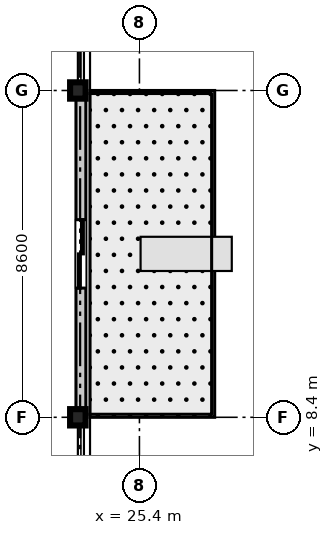
"""IFC4 building model, lengths in metres.
Left out: names, types, materials, properties, quantities, classifications, styles, units other than length and angle.
Written with IfcOpenShell. Run it as: python <this file> out.ifc"""

import sys

from ifc_helpers import new_model, si_unit, direction, frame, frame_2d, origin, origin_2d, place, context, subcontext, project, spatial, rectangle, i_section, extrude, source, transform, mapped, element, fill, save


model = new_model("IFC4")
c1 = context("Model", 3, precision=1e-05, world=origin(), true_north=direction((0.0, 1.0)))
c2 = subcontext(c1, "Body", "Model", "MODEL_VIEW")
j1 = project(units=[si_unit("LENGTHUNIT", "METRE"), si_unit("PLANEANGLEUNIT", "RADIAN")], contexts=[c1])
p1 = place(None, origin())
s1 = spatial("IfcSite", under=j1, at=p1, CompositionType="ELEMENT")
p2 = place(p1, origin())
s2 = spatial("IfcBuilding", under=s1, at=p2, CompositionType="ELEMENT")
p3 = place(p2, frame((0.0, 0.0, 102.9)))
s3 = spatial("IfcBuildingStorey", under=s2, at=p3, CompositionType="ELEMENT", Elevation=102.9)
m1 = source(origin(), c2, "Body", "SweptSolid", [
    extrude(i_section(OverallWidth=0.409, OverallDepth=0.43, WebThickness=0.021, FlangeThickness=0.034, at=origin_2d()), origin(), (0.0, 0.0, 1.0), 3.605),
])
for number, where, z_axis, x_axis in (
    (1, (23.78, 8.4, 0.0), (0.0, 0.0, 1.0), (1.0, 0.0, 0.0)),
    (2, (23.78, 17.0, 0.0), (0.0, 0.0, 1.0), (1.0, 0.0, 0.0)),
):
    element("IfcColumn", number, at=place(p3, frame(where, z_axis=z_axis, x_axis=x_axis)), inside=s3, PredefinedType="COLUMN", context=c2, shape_type="MappedRepresentation", body=[
        mapped(m1, transform((0.0, 0.0, 0.0), scale=1.0)),
    ])
m2 = source(origin(), c2, "Body", "SweptSolid", [
    extrude(rectangle(XDim=8.6, YDim=0.26, at=frame_2d((4.3, 0.0))), origin(), (0.0, 0.0, 1.0), 2.86),
])
p4 = place(p3, frame((23.86, 8.4, 0.0), z_axis=(0.0, 0.0, 1.0), x_axis=(0.0, 1.0, 0.0)))
e3 = element("IfcWall", 3, at=p4, inside=s3, PredefinedType="STANDARD", context=c2, shape_type="MappedRepresentation", body=[
    mapped(m2, transform((0.0, 0.0, 0.0), scale=1.0)),
])
p5 = place(p4, frame((3.4, 0.0, 0.0)))
e4 = element("IfcOpeningElement", 4, at=p5, cuts=e3, PredefinedType="OPENING", context=c2, shape_type="SweptSolid", body=[
    extrude(rectangle(XDim=1.8, YDim=2.25, at=frame_2d((0.9, 1.125))), frame((0.0, 0.14, 0.0), z_axis=(0.0, -1.0, 0.0), x_axis=(1.0, 0.0, 0.0)), (0.0, 0.0, 1.0), 0.28),
])
m3 = source(origin(), c2, "Body", "SweptSolid", [
    extrude(rectangle(XDim=1.8, YDim=2.25, at=frame_2d((0.9, 1.125))), frame((0.0, 0.025, 0.0), z_axis=(0.0, -1.0, 0.0), x_axis=(1.0, 0.0, 0.0)), (0.0, 0.0, 1.0), 0.05),
])
p6 = place(p5, frame((1.8, 0.0, 0.0), z_axis=(0.0, 0.0, 1.0), x_axis=(-1.0, 0.0, 0.0)))
e5 = element("IfcDoor", 5, at=p6, inside=s3, OperationType="DOUBLE_DOOR_SLIDING", PredefinedType="DOOR", context=c2, shape_type="MappedRepresentation", body=[
    mapped(m3, transform((0.0, 0.0, 0.0), scale=1.0)),
])
fill(e4, e5)
save(model, sys.argv[1])
